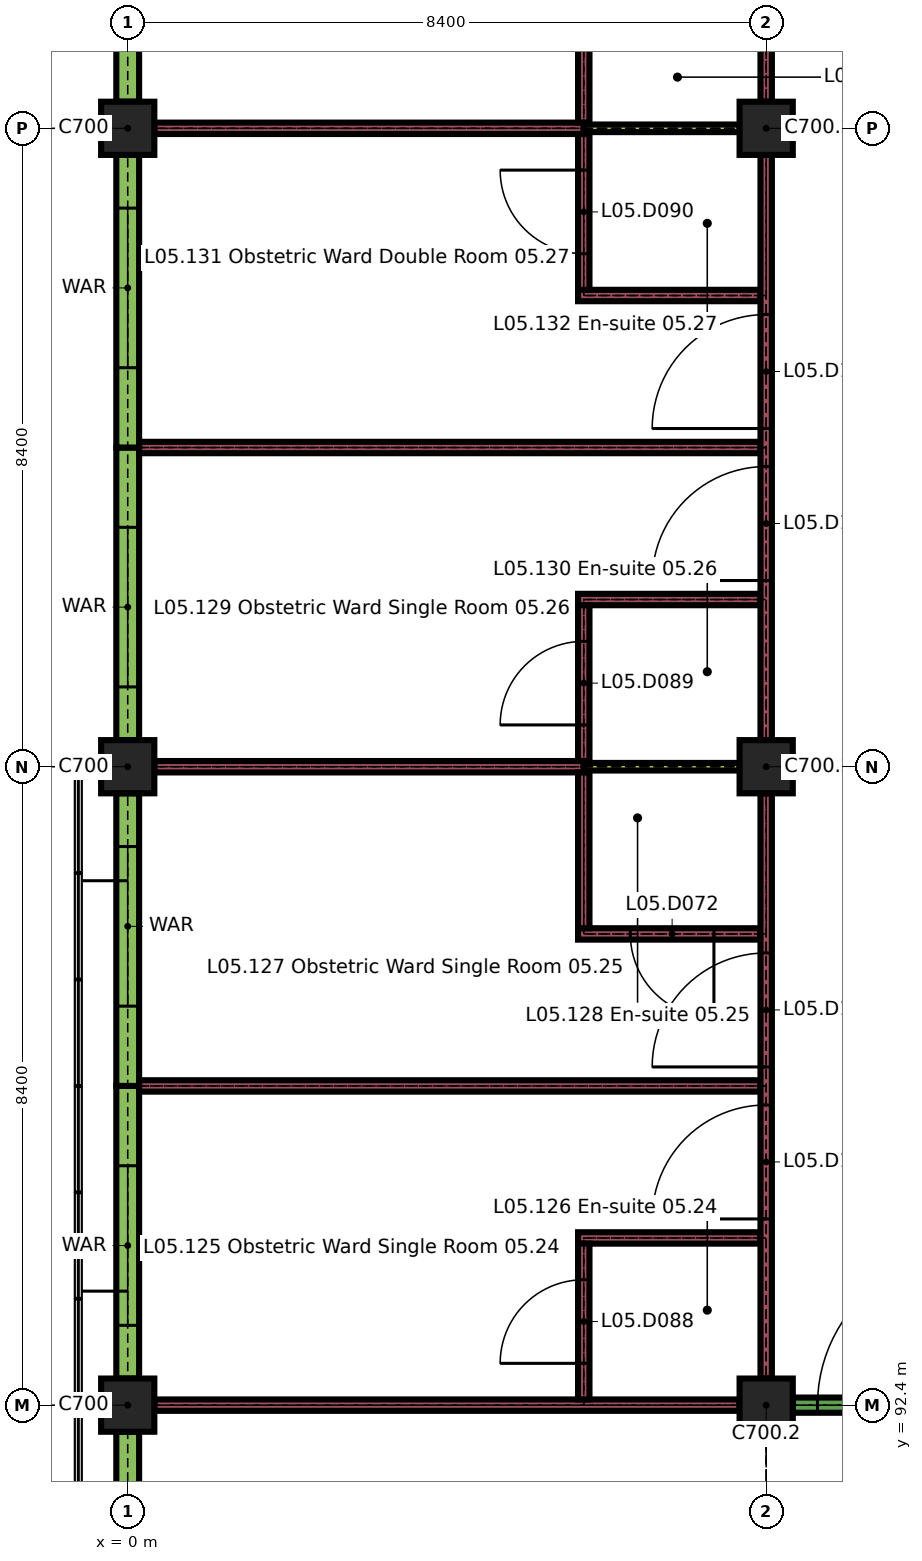
"""IFC4 building model, lengths in metres.
Left out: names, types, materials, properties, quantities, classifications, styles, units other than length and angle.
Written with IfcOpenShell. Run it as: python <this file> out.ifc"""

import sys

from ifc_helpers import new_model, si_unit, direction, frame, frame_2d, origin, origin_2d, place, context, subcontext, project, spatial, rectangle, extrude, element, fill, save


model = new_model("IFC4")
c1 = context("Model", 3, precision=1e-05, world=origin(), true_north=direction((0.0, 1.0)))
c2 = subcontext(c1, "Body", "Model", "MODEL_VIEW")
j1 = project(units=[si_unit("LENGTHUNIT", "METRE"), si_unit("PLANEANGLEUNIT", "RADIAN")], contexts=[c1])
p1 = place(None, origin())
s1 = spatial("IfcSite", under=j1, at=p1, CompositionType="ELEMENT")
p2 = place(p1, origin())
s2 = spatial("IfcBuilding", under=s1, at=p2, CompositionType="ELEMENT")
p3 = place(p2, frame((0.0, 0.0, 22.5)))
s3 = spatial("IfcBuildingStorey", under=s2, at=p3, CompositionType="ELEMENT", Elevation=22.5)
for number, where, z_axis, x_axis in (
    (1, (0.0, 92.4, 0.0), (0.0, 0.0, 1.0), (1.0, 0.0, 0.0)),
    (2, (8.4, 92.4, 0.0), (0.0, 0.0, 1.0), (1.0, 0.0, 0.0)),
    (3, (0.0, 100.8, 0.0), (0.0, 0.0, 1.0), (1.0, 0.0, 0.0)),
    (4, (8.4, 100.8, 0.0), (0.0, 0.0, 1.0), (1.0, 0.0, 0.0)),
    (5, (0.0, 109.2, 0.0), (0.0, 0.0, 1.0), (1.0, 0.0, 0.0)),
    (6, (8.4, 109.2, 0.0), (0.0, 0.0, 1.0), (1.0, 0.0, 0.0)),
):
    element("IfcColumn", number, at=place(p3, frame(where, z_axis=z_axis, x_axis=x_axis)), inside=s3, PredefinedType="COLUMN", context=c2, shape_type="SweptSolid", body=[
        extrude(rectangle(XDim=0.7, YDim=0.7, at=origin_2d()), origin(), (0.0, 0.0, 1.0), 3.26),
    ])
p4 = place(p3, frame((0.0, 91.0, 0.0), z_axis=(0.0, 0.0, 1.0), x_axis=(0.0, 1.0, 0.0)))
e7 = element("IfcWall", 7, at=p4, inside=s3, PredefinedType="SOLIDWALL", context=c2, shape_type="SweptSolid", body=[
    extrude(rectangle(XDim=1.05, YDim=0.3, at=frame_2d((0.525, 0.0))), origin(), (0.0, 0.0, 1.0), 2.96),
])
p5 = place(p3, frame((0.0, 92.75, 0.0), z_axis=(0.0, 0.0, 1.0), x_axis=(0.0, 1.0, 0.0)))
e8 = element("IfcWall", 8, at=p5, inside=s3, PredefinedType="SOLIDWALL", context=c2, shape_type="SweptSolid", body=[
    extrude(rectangle(XDim=3.85, YDim=0.3, at=frame_2d((1.925, 0.0))), origin(), (0.0, 0.0, 1.0), 2.96),
])
p6 = place(p5, frame((0.7, 0.0, 0.9)))
e9 = element("IfcOpeningElement", 9, at=p6, cuts=e8, PredefinedType="OPENING", context=c2, shape_type="SweptSolid", body=[
    extrude(rectangle(XDim=2.1, YDim=1.5, at=frame_2d((1.05, 0.75))), frame((0.0, 0.16, 0.0), z_axis=(0.0, -1.0, 0.0), x_axis=(1.0, 0.0, 0.0)), (0.0, 0.0, 1.0), 0.32),
])
p7 = place(p3, frame((0.0, 96.6, 0.0), z_axis=(0.0, 0.0, 1.0), x_axis=(0.0, 1.0, 0.0)))
e10 = element("IfcWall", 10, at=p7, inside=s3, PredefinedType="SOLIDWALL", context=c2, shape_type="SweptSolid", body=[
    extrude(rectangle(XDim=3.85, YDim=0.3, at=frame_2d((1.925, 0.0))), origin(), (0.0, 0.0, 1.0), 2.96),
])
p8 = place(p7, frame((1.05, 0.0, 0.9)))
e11 = element("IfcOpeningElement", 11, at=p8, cuts=e10, PredefinedType="OPENING", context=c2, shape_type="SweptSolid", body=[
    extrude(rectangle(XDim=2.1, YDim=1.5, at=frame_2d((1.05, 0.75))), frame((0.0, 0.16, 0.0), z_axis=(0.0, -1.0, 0.0), x_axis=(1.0, 0.0, 0.0)), (0.0, 0.0, 1.0), 0.32),
])
p9 = place(p3, frame((0.0, 101.15, 0.0), z_axis=(0.0, 0.0, 1.0), x_axis=(0.0, 1.0, 0.0)))
e12 = element("IfcWall", 12, at=p9, inside=s3, PredefinedType="SOLIDWALL", context=c2, shape_type="SweptSolid", body=[
    extrude(rectangle(XDim=3.85, YDim=0.3, at=frame_2d((1.925, 0.0))), origin(), (0.0, 0.0, 1.0), 2.96),
])
p10 = place(p9, frame((0.7, 0.0, 0.9)))
e13 = element("IfcOpeningElement", 13, at=p10, cuts=e12, PredefinedType="OPENING", context=c2, shape_type="SweptSolid", body=[
    extrude(rectangle(XDim=2.1, YDim=1.5, at=frame_2d((1.05, 0.75))), frame((0.0, 0.16, 0.0), z_axis=(0.0, -1.0, 0.0), x_axis=(1.0, 0.0, 0.0)), (0.0, 0.0, 1.0), 0.32),
])
p11 = place(p3, frame((0.0, 105.0, 0.0), z_axis=(0.0, 0.0, 1.0), x_axis=(0.0, 1.0, 0.0)))
e14 = element("IfcWall", 14, at=p11, inside=s3, PredefinedType="SOLIDWALL", context=c2, shape_type="SweptSolid", body=[
    extrude(rectangle(XDim=3.85, YDim=0.3, at=frame_2d((1.925, 0.0))), origin(), (0.0, 0.0, 1.0), 2.96),
])
p12 = place(p11, frame((1.05, 0.0, 0.9)))
e15 = element("IfcOpeningElement", 15, at=p12, cuts=e14, PredefinedType="OPENING", context=c2, shape_type="SweptSolid", body=[
    extrude(rectangle(XDim=2.1, YDim=1.5, at=frame_2d((1.05, 0.75))), frame((0.0, 0.16, 0.0), z_axis=(0.0, -1.0, 0.0), x_axis=(1.0, 0.0, 0.0)), (0.0, 0.0, 1.0), 0.32),
])
p13 = place(p3, frame((0.0, 109.55, 0.0), z_axis=(0.0, 0.0, 1.0), x_axis=(0.0, 1.0, 0.0)))
e16 = element("IfcWall", 16, at=p13, inside=s3, PredefinedType="SOLIDWALL", context=c2, shape_type="SweptSolid", body=[
    extrude(rectangle(XDim=3.85, YDim=0.3, at=frame_2d((1.925, 0.0))), origin(), (0.0, 0.0, 1.0), 2.96),
])
p14 = place(p13, frame((0.7, 0.0, 0.9)))
e17 = element("IfcOpeningElement", 17, at=p14, cuts=e16, PredefinedType="OPENING", context=c2, shape_type="SweptSolid", body=[
    extrude(rectangle(XDim=2.1, YDim=1.5, at=frame_2d((1.05, 0.75))), frame((0.0, 0.16, 0.0), z_axis=(0.0, -1.0, 0.0), x_axis=(1.0, 0.0, 0.0)), (0.0, 0.0, 1.0), 0.32),
])
p15 = place(p3, frame((0.35, 92.4, 0.0), z_axis=(0.0, 0.0, 1.0), x_axis=(1.0, 0.0, 0.0)))
e18 = element("IfcWall", 18, at=p15, inside=s3, PredefinedType="PARTITIONING", context=c2, shape_type="SweptSolid", body=[
    extrude(rectangle(XDim=7.7, YDim=0.15, at=frame_2d((3.85, 0.0))), origin(), (0.0, 0.0, 1.0), 3.26),
])
p16 = place(p3, frame((8.75, 92.4, 0.0), z_axis=(0.0, 0.0, 1.0), x_axis=(1.0, 0.0, 0.0)))
e19 = element("IfcWall", 19, at=p16, inside=s3, PredefinedType="PARTITIONING", context=c2, shape_type="SweptSolid", body=[
    extrude(rectangle(XDim=7.7, YDim=0.2, at=frame_2d((3.85, 0.0))), origin(), (0.0, 0.0, 1.0), 3.26),
])
p17 = place(p16, frame((0.325, 0.0, 0.0)))
e20 = element("IfcOpeningElement", 20, at=p17, cuts=e19, PredefinedType="OPENING", context=c2, shape_type="SweptSolid", body=[
    extrude(rectangle(XDim=2.0, YDim=2.4, at=frame_2d((1.0, 1.2))), frame((0.0, 0.11, 0.0), z_axis=(0.0, -1.0, 0.0), x_axis=(1.0, 0.0, 0.0)), (0.0, 0.0, 1.0), 0.22),
])
p18 = place(p16, frame((5.375, 0.0, 0.0)))
e21 = element("IfcOpeningElement", 21, at=p18, cuts=e19, PredefinedType="OPENING", context=c2, shape_type="SweptSolid", body=[
    extrude(rectangle(XDim=2.0, YDim=2.4, at=frame_2d((1.0, 1.2))), frame((0.0, 0.11, 0.0), z_axis=(0.0, -1.0, 0.0), x_axis=(1.0, 0.0, 0.0)), (0.0, 0.0, 1.0), 0.22),
])
p19 = place(p3, frame((5.925, 94.6, 0.0), z_axis=(0.0, 0.0, 1.0), x_axis=(1.0, 0.0, 0.0)))
e22 = element("IfcWall", 22, at=p19, inside=s3, PredefinedType="PARTITIONING", context=c2, shape_type="SweptSolid", body=[
    extrude(rectangle(XDim=2.4, YDim=0.15, at=frame_2d((1.2, 0.0))), origin(), (0.0, 0.0, 1.0), 3.26),
])
p20 = place(p3, frame((0.15, 96.6, 0.0), z_axis=(0.0, 0.0, 1.0), x_axis=(1.0, 0.0, 0.0)))
e23 = element("IfcWall", 23, at=p20, inside=s3, PredefinedType="PARTITIONING", context=c2, shape_type="SweptSolid", body=[
    extrude(rectangle(XDim=8.175, YDim=0.15, at=frame_2d((4.087, 0.0))), origin(), (0.0, 0.0, 1.0), 3.26),
])
p21 = place(p3, frame((5.925, 98.6, 0.0), z_axis=(0.0, 0.0, 1.0), x_axis=(1.0, 0.0, 0.0)))
e24 = element("IfcWall", 24, at=p21, inside=s3, PredefinedType="PARTITIONING", context=c2, shape_type="SweptSolid", body=[
    extrude(rectangle(XDim=2.4, YDim=0.15, at=frame_2d((1.2, 0.0))), origin(), (0.0, 0.0, 1.0), 3.26),
])
p22 = place(p21, frame((0.688, 0.0, 0.0)))
e25 = element("IfcOpeningElement", 25, at=p22, cuts=e24, PredefinedType="OPENING", context=c2, shape_type="SweptSolid", body=[
    extrude(rectangle(XDim=1.1, YDim=2.1, at=frame_2d((0.55, 1.05))), frame((0.0, 0.085, 0.0), z_axis=(0.0, -1.0, 0.0), x_axis=(1.0, 0.0, 0.0)), (0.0, 0.0, 1.0), 0.17),
])
p23 = place(p3, frame((0.35, 100.8, 0.0), z_axis=(0.0, 0.0, 1.0), x_axis=(1.0, 0.0, 0.0)))
e26 = element("IfcWall", 26, at=p23, inside=s3, PredefinedType="PARTITIONING", context=c2, shape_type="SweptSolid", body=[
    extrude(rectangle(XDim=5.65, YDim=0.15, at=frame_2d((2.825, 0.0))), origin(), (0.0, 0.0, 1.0), 3.26),
])
p24 = place(p3, frame((6.0, 100.8, 0.0), z_axis=(0.0, 0.0, 1.0), x_axis=(1.0, 0.0, 0.0)))
e27 = element("IfcWall", 27, at=p24, inside=s3, PredefinedType="PARTITIONING", context=c2, shape_type="SweptSolid", body=[
    extrude(rectangle(XDim=2.05, YDim=0.1, at=frame_2d((1.025, 0.0))), origin(), (0.0, 0.0, 1.0), 3.26),
])
p25 = place(p3, frame((5.925, 103.0, 0.0), z_axis=(0.0, 0.0, 1.0), x_axis=(1.0, 0.0, 0.0)))
e28 = element("IfcWall", 28, at=p25, inside=s3, PredefinedType="PARTITIONING", context=c2, shape_type="SweptSolid", body=[
    extrude(rectangle(XDim=2.4, YDim=0.15, at=frame_2d((1.2, 0.0))), origin(), (0.0, 0.0, 1.0), 3.26),
])
p26 = place(p3, frame((0.15, 105.0, 0.0), z_axis=(0.0, 0.0, 1.0), x_axis=(1.0, 0.0, 0.0)))
e29 = element("IfcWall", 29, at=p26, inside=s3, PredefinedType="PARTITIONING", context=c2, shape_type="SweptSolid", body=[
    extrude(rectangle(XDim=8.175, YDim=0.15, at=frame_2d((4.087, 0.0))), origin(), (0.0, 0.0, 1.0), 3.26),
])
p27 = place(p3, frame((5.925, 107.0, 0.0), z_axis=(0.0, 0.0, 1.0), x_axis=(1.0, 0.0, 0.0)))
e30 = element("IfcWall", 30, at=p27, inside=s3, PredefinedType="PARTITIONING", context=c2, shape_type="SweptSolid", body=[
    extrude(rectangle(XDim=2.4, YDim=0.15, at=frame_2d((1.2, 0.0))), origin(), (0.0, 0.0, 1.0), 3.26),
])
p28 = place(p3, frame((0.35, 109.2, 0.0), z_axis=(0.0, 0.0, 1.0), x_axis=(1.0, 0.0, 0.0)))
e31 = element("IfcWall", 31, at=p28, inside=s3, PredefinedType="PARTITIONING", context=c2, shape_type="SweptSolid", body=[
    extrude(rectangle(XDim=5.65, YDim=0.15, at=frame_2d((2.825, 0.0))), origin(), (0.0, 0.0, 1.0), 3.26),
])
p29 = place(p3, frame((6.0, 109.2, 0.0), z_axis=(0.0, 0.0, 1.0), x_axis=(1.0, 0.0, 0.0)))
e32 = element("IfcWall", 32, at=p29, inside=s3, PredefinedType="PARTITIONING", context=c2, shape_type="SweptSolid", body=[
    extrude(rectangle(XDim=2.05, YDim=0.1, at=frame_2d((1.025, 0.0))), origin(), (0.0, 0.0, 1.0), 3.26),
])
p30 = place(p3, frame((6.0, 92.475, 0.0), z_axis=(0.0, 0.0, 1.0), x_axis=(0.0, 1.0, 0.0)))
e33 = element("IfcWall", 33, at=p30, inside=s3, PredefinedType="PARTITIONING", context=c2, shape_type="SweptSolid", body=[
    extrude(rectangle(XDim=2.05, YDim=0.15, at=frame_2d((1.025, 0.0))), origin(), (0.0, 0.0, 1.0), 3.26),
])
p31 = place(p30, frame((0.475, 0.0, 0.0)))
e34 = element("IfcOpeningElement", 34, at=p31, cuts=e33, PredefinedType="OPENING", context=c2, shape_type="SweptSolid", body=[
    extrude(rectangle(XDim=1.1, YDim=2.1, at=frame_2d((0.55, 1.05))), frame((0.0, 0.085, 0.0), z_axis=(0.0, -1.0, 0.0), x_axis=(1.0, 0.0, 0.0)), (0.0, 0.0, 1.0), 0.17),
])
p32 = place(p3, frame((6.0, 98.675, 0.0), z_axis=(0.0, 0.0, 1.0), x_axis=(0.0, 1.0, 0.0)))
e35 = element("IfcWall", 35, at=p32, inside=s3, PredefinedType="PARTITIONING", context=c2, shape_type="SweptSolid", body=[
    extrude(rectangle(XDim=2.05, YDim=0.15, at=frame_2d((1.025, 0.0))), origin(), (0.0, 0.0, 1.0), 3.26),
])
p33 = place(p3, frame((6.0, 100.875, 0.0), z_axis=(0.0, 0.0, 1.0), x_axis=(0.0, 1.0, 0.0)))
e36 = element("IfcWall", 36, at=p33, inside=s3, PredefinedType="PARTITIONING", context=c2, shape_type="SweptSolid", body=[
    extrude(rectangle(XDim=2.05, YDim=0.15, at=frame_2d((1.025, 0.0))), origin(), (0.0, 0.0, 1.0), 3.26),
])
p34 = place(p33, frame((0.475, 0.0, 0.0)))
e37 = element("IfcOpeningElement", 37, at=p34, cuts=e36, PredefinedType="OPENING", context=c2, shape_type="SweptSolid", body=[
    extrude(rectangle(XDim=1.1, YDim=2.1, at=frame_2d((0.55, 1.05))), frame((0.0, 0.085, 0.0), z_axis=(0.0, -1.0, 0.0), x_axis=(1.0, 0.0, 0.0)), (0.0, 0.0, 1.0), 0.17),
])
p35 = place(p3, frame((6.0, 107.075, 0.0), z_axis=(0.0, 0.0, 1.0), x_axis=(0.0, 1.0, 0.0)))
e38 = element("IfcWall", 38, at=p35, inside=s3, PredefinedType="PARTITIONING", context=c2, shape_type="SweptSolid", body=[
    extrude(rectangle(XDim=2.05, YDim=0.15, at=frame_2d((1.025, 0.0))), origin(), (0.0, 0.0, 1.0), 3.26),
])
p36 = place(p35, frame((0.475, 0.0, 0.0)))
e39 = element("IfcOpeningElement", 39, at=p36, cuts=e38, PredefinedType="OPENING", context=c2, shape_type="SweptSolid", body=[
    extrude(rectangle(XDim=1.1, YDim=2.1, at=frame_2d((0.55, 1.05))), frame((0.0, 0.085, 0.0), z_axis=(0.0, -1.0, 0.0), x_axis=(1.0, 0.0, 0.0)), (0.0, 0.0, 1.0), 0.17),
])
p37 = place(p3, frame((6.0, 109.275, 0.0), z_axis=(0.0, 0.0, 1.0), x_axis=(0.0, 1.0, 0.0)))
e40 = element("IfcWall", 40, at=p37, inside=s3, PredefinedType="PARTITIONING", context=c2, shape_type="SweptSolid", body=[
    extrude(rectangle(XDim=2.05, YDim=0.15, at=frame_2d((1.025, 0.0))), origin(), (0.0, 0.0, 1.0), 3.26),
])
p38 = place(p3, frame((8.4, 92.75, 0.0), z_axis=(0.0, 0.0, 1.0), x_axis=(0.0, 1.0, 0.0)))
e41 = element("IfcWall", 41, at=p38, inside=s3, PredefinedType="PARTITIONING", context=c2, shape_type="SweptSolid", body=[
    extrude(rectangle(XDim=7.7, YDim=0.15, at=frame_2d((3.85, 0.0))), origin(), (0.0, 0.0, 1.0), 3.26),
])
p39 = place(p38, frame((2.1, 0.0, 0.0)))
e42 = element("IfcOpeningElement", 42, at=p39, cuts=e41, PredefinedType="OPENING", context=c2, shape_type="SweptSolid", body=[
    extrude(rectangle(XDim=1.5, YDim=2.4, at=frame_2d((0.75, 1.2))), frame((0.0, 0.085, 0.0), z_axis=(0.0, -1.0, 0.0), x_axis=(1.0, 0.0, 0.0)), (0.0, 0.0, 1.0), 0.17),
])
p40 = place(p38, frame((4.1, 0.0, 0.0)))
e43 = element("IfcOpeningElement", 43, at=p40, cuts=e41, PredefinedType="OPENING", context=c2, shape_type="SweptSolid", body=[
    extrude(rectangle(XDim=1.5, YDim=2.4, at=frame_2d((0.75, 1.2))), frame((0.0, 0.085, 0.0), z_axis=(0.0, -1.0, 0.0), x_axis=(1.0, 0.0, 0.0)), (0.0, 0.0, 1.0), 0.17),
])
p41 = place(p3, frame((8.4, 101.15, 0.0), z_axis=(0.0, 0.0, 1.0), x_axis=(0.0, 1.0, 0.0)))
e44 = element("IfcWall", 44, at=p41, inside=s3, PredefinedType="PARTITIONING", context=c2, shape_type="SweptSolid", body=[
    extrude(rectangle(XDim=7.7, YDim=0.15, at=frame_2d((3.85, 0.0))), origin(), (0.0, 0.0, 1.0), 3.26),
])
p42 = place(p41, frame((2.1, 0.0, 0.0)))
e45 = element("IfcOpeningElement", 45, at=p42, cuts=e44, PredefinedType="OPENING", context=c2, shape_type="SweptSolid", body=[
    extrude(rectangle(XDim=1.5, YDim=2.4, at=frame_2d((0.75, 1.2))), frame((0.0, 0.085, 0.0), z_axis=(0.0, -1.0, 0.0), x_axis=(1.0, 0.0, 0.0)), (0.0, 0.0, 1.0), 0.17),
])
p43 = place(p41, frame((4.1, 0.0, 0.0)))
e46 = element("IfcOpeningElement", 46, at=p43, cuts=e44, PredefinedType="OPENING", context=c2, shape_type="SweptSolid", body=[
    extrude(rectangle(XDim=1.5, YDim=2.4, at=frame_2d((0.75, 1.2))), frame((0.0, 0.085, 0.0), z_axis=(0.0, -1.0, 0.0), x_axis=(1.0, 0.0, 0.0)), (0.0, 0.0, 1.0), 0.17),
])
p44 = place(p3, frame((8.4, 109.55, 0.0), z_axis=(0.0, 0.0, 1.0), x_axis=(0.0, 1.0, 0.0)))
e47 = element("IfcWall", 47, at=p44, inside=s3, PredefinedType="PARTITIONING", context=c2, shape_type="SweptSolid", body=[
    extrude(rectangle(XDim=3.775, YDim=0.15, at=frame_2d((1.887, 0.0))), origin(), (0.0, 0.0, 1.0), 3.26),
])
p45 = place(p44, frame((2.062, 0.0, 0.0)))
e48 = element("IfcOpeningElement", 48, at=p45, cuts=e47, PredefinedType="OPENING", context=c2, shape_type="SweptSolid", body=[
    extrude(rectangle(XDim=1.5, YDim=2.4, at=frame_2d((0.75, 1.2))), frame((0.0, 0.085, 0.0), z_axis=(0.0, -1.0, 0.0), x_axis=(1.0, 0.0, 0.0)), (0.0, 0.0, 1.0), 0.17),
])
p46 = place(p6, origin())
e49 = element("IfcWindow", 49, at=p46, inside=s3, PartitioningType="DOUBLE_PANEL_VERTICAL", PredefinedType="WINDOW", context=c2, shape_type="SweptSolid", body=[
    extrude(rectangle(XDim=2.1, YDim=1.5, at=frame_2d((1.05, 0.75))), frame((0.0, 0.05, 0.0), z_axis=(0.0, -1.0, 0.0), x_axis=(1.0, 0.0, 0.0)), (0.0, 0.0, 1.0), 0.1),
])
fill(e9, e49)
p47 = place(p8, origin())
e50 = element("IfcWindow", 50, at=p47, inside=s3, PartitioningType="DOUBLE_PANEL_VERTICAL", PredefinedType="WINDOW", context=c2, shape_type="SweptSolid", body=[
    extrude(rectangle(XDim=2.1, YDim=1.5, at=frame_2d((1.05, 0.75))), frame((0.0, 0.05, 0.0), z_axis=(0.0, -1.0, 0.0), x_axis=(1.0, 0.0, 0.0)), (0.0, 0.0, 1.0), 0.1),
])
fill(e11, e50)
p48 = place(p10, origin())
e51 = element("IfcWindow", 51, at=p48, inside=s3, PartitioningType="DOUBLE_PANEL_VERTICAL", PredefinedType="WINDOW", context=c2, shape_type="SweptSolid", body=[
    extrude(rectangle(XDim=2.1, YDim=1.5, at=frame_2d((1.05, 0.75))), frame((0.0, 0.05, 0.0), z_axis=(0.0, -1.0, 0.0), x_axis=(1.0, 0.0, 0.0)), (0.0, 0.0, 1.0), 0.1),
])
fill(e13, e51)
p49 = place(p12, origin())
e52 = element("IfcWindow", 52, at=p49, inside=s3, PartitioningType="DOUBLE_PANEL_VERTICAL", PredefinedType="WINDOW", context=c2, shape_type="SweptSolid", body=[
    extrude(rectangle(XDim=2.1, YDim=1.5, at=frame_2d((1.05, 0.75))), frame((0.0, 0.05, 0.0), z_axis=(0.0, -1.0, 0.0), x_axis=(1.0, 0.0, 0.0)), (0.0, 0.0, 1.0), 0.1),
])
fill(e15, e52)
p50 = place(p17, origin())
e53 = element("IfcDoor", 53, at=p50, inside=s3, OperationType="SINGLE_SWING_LEFT", PredefinedType="DOOR", context=c2, shape_type="SweptSolid", body=[
    extrude(rectangle(XDim=2.0, YDim=2.4, at=frame_2d((1.0, 1.2))), frame((0.0, 0.03, 0.0), z_axis=(0.0, -1.0, 0.0), x_axis=(1.0, 0.0, 0.0)), (0.0, 0.0, 1.0), 0.06),
])
fill(e20, e53)
p51 = place(p22, origin())
e54 = element("IfcDoor", 54, at=p51, inside=s3, OperationType="SINGLE_SWING_RIGHT", PredefinedType="DOOR", context=c2, shape_type="SweptSolid", body=[
    extrude(rectangle(XDim=1.1, YDim=2.1, at=frame_2d((0.55, 1.05))), frame((0.0, 0.025, 0.0), z_axis=(0.0, -1.0, 0.0), x_axis=(1.0, 0.0, 0.0)), (0.0, 0.0, 1.0), 0.05),
])
fill(e25, e54)
p52 = place(p31, origin())
e55 = element("IfcDoor", 55, at=p52, inside=s3, OperationType="SINGLE_SWING_RIGHT", PredefinedType="DOOR", context=c2, shape_type="SweptSolid", body=[
    extrude(rectangle(XDim=1.1, YDim=2.1, at=frame_2d((0.55, 1.05))), frame((0.0, 0.025, 0.0), z_axis=(0.0, -1.0, 0.0), x_axis=(1.0, 0.0, 0.0)), (0.0, 0.0, 1.0), 0.05),
])
fill(e34, e55)
p53 = place(p34, origin())
e56 = element("IfcDoor", 56, at=p53, inside=s3, OperationType="SINGLE_SWING_RIGHT", PredefinedType="DOOR", context=c2, shape_type="SweptSolid", body=[
    extrude(rectangle(XDim=1.1, YDim=2.1, at=frame_2d((0.55, 1.05))), frame((0.0, 0.025, 0.0), z_axis=(0.0, -1.0, 0.0), x_axis=(1.0, 0.0, 0.0)), (0.0, 0.0, 1.0), 0.05),
])
fill(e37, e56)
p54 = place(p36, origin())
e57 = element("IfcDoor", 57, at=p54, inside=s3, OperationType="SINGLE_SWING_LEFT", PredefinedType="DOOR", context=c2, shape_type="SweptSolid", body=[
    extrude(rectangle(XDim=1.1, YDim=2.1, at=frame_2d((0.55, 1.05))), frame((0.0, 0.025, 0.0), z_axis=(0.0, -1.0, 0.0), x_axis=(1.0, 0.0, 0.0)), (0.0, 0.0, 1.0), 0.05),
])
fill(e39, e57)
p55 = place(p39, origin())
e58 = element("IfcDoor", 58, at=p55, inside=s3, OperationType="SINGLE_SWING_RIGHT", PredefinedType="DOOR", context=c2, shape_type="SweptSolid", body=[
    extrude(rectangle(XDim=1.5, YDim=2.4, at=frame_2d((0.75, 1.2))), frame((0.0, 0.03, 0.0), z_axis=(0.0, -1.0, 0.0), x_axis=(1.0, 0.0, 0.0)), (0.0, 0.0, 1.0), 0.06),
])
fill(e42, e58)
p56 = place(p40, origin())
e59 = element("IfcDoor", 59, at=p56, inside=s3, OperationType="SINGLE_SWING_RIGHT", PredefinedType="DOOR", context=c2, shape_type="SweptSolid", body=[
    extrude(rectangle(XDim=1.5, YDim=2.4, at=frame_2d((0.75, 1.2))), frame((0.0, 0.03, 0.0), z_axis=(0.0, -1.0, 0.0), x_axis=(1.0, 0.0, 0.0)), (0.0, 0.0, 1.0), 0.06),
])
fill(e43, e59)
p57 = place(p42, origin())
e60 = element("IfcDoor", 60, at=p57, inside=s3, OperationType="SINGLE_SWING_RIGHT", PredefinedType="DOOR", context=c2, shape_type="SweptSolid", body=[
    extrude(rectangle(XDim=1.5, YDim=2.4, at=frame_2d((0.75, 1.2))), frame((0.0, 0.03, 0.0), z_axis=(0.0, -1.0, 0.0), x_axis=(1.0, 0.0, 0.0)), (0.0, 0.0, 1.0), 0.06),
])
fill(e45, e60)
p58 = place(p43, origin())
e61 = element("IfcDoor", 61, at=p58, inside=s3, OperationType="SINGLE_SWING_RIGHT", PredefinedType="DOOR", context=c2, shape_type="SweptSolid", body=[
    extrude(rectangle(XDim=1.5, YDim=2.4, at=frame_2d((0.75, 1.2))), frame((0.0, 0.03, 0.0), z_axis=(0.0, -1.0, 0.0), x_axis=(1.0, 0.0, 0.0)), (0.0, 0.0, 1.0), 0.06),
])
fill(e46, e61)
save(model, sys.argv[1])
